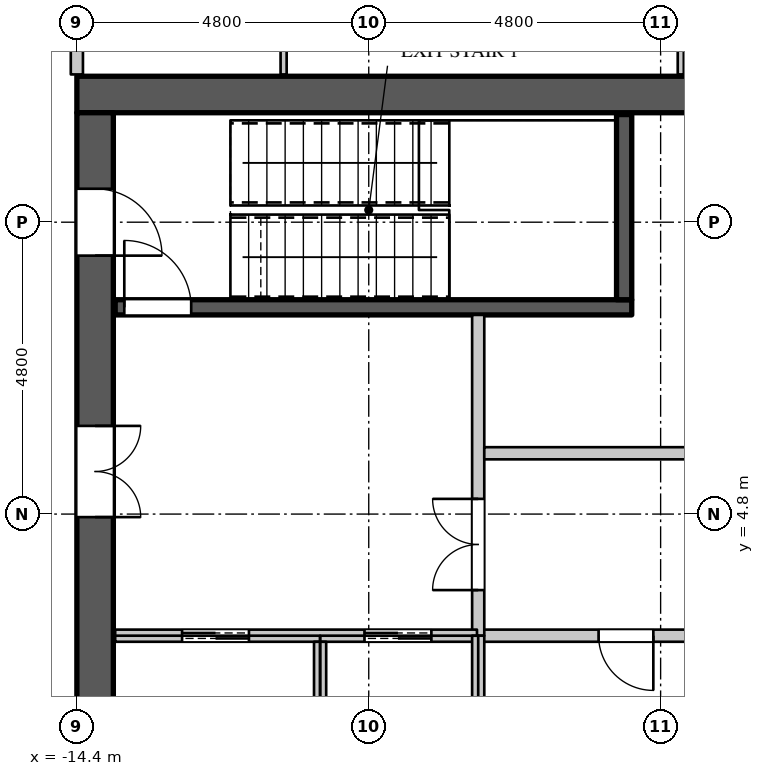
"""IFC4 building model, lengths in metres.
Left out: names, types, materials, properties, quantities, classifications, styles, units other than length and angle.
Written with IfcOpenShell. Run it as: python <this file> out.ifc"""

import sys

from ifc_helpers import new_model, si_unit, direction, frame, frame_2d, origin, place, context, subcontext, project, spatial, rectangle, extrude, element, fill, save


model = new_model("IFC4")
c1 = context("Model", 3, precision=1e-05, world=origin(), true_north=direction((0.0, 1.0)))
c2 = subcontext(c1, "Body", "Model", "MODEL_VIEW")
j1 = project(units=[si_unit("LENGTHUNIT", "METRE"), si_unit("PLANEANGLEUNIT", "RADIAN")], contexts=[c1])
p1 = place(None, origin())
s1 = spatial("IfcSite", under=j1, at=p1, CompositionType="ELEMENT")
p2 = place(p1, origin())
s2 = spatial("IfcBuilding", under=s1, at=p2, CompositionType="ELEMENT")
p3 = place(p2, frame((0.0, 0.0, 310.5)))
s3 = spatial("IfcBuildingStorey", under=s2, at=p3, CompositionType="ELEMENT", Elevation=310.5)
p4 = place(p3, frame((-14.4, 11.7, 0.0), z_axis=(0.0, 0.0, 1.0), x_axis=(1.0, 0.0, 0.0)))
e1 = element("IfcWall", 1, at=p4, inside=s3, PredefinedType="SHEAR", context=c2, shape_type="SweptSolid", body=[
    extrude(rectangle(XDim=28.8, YDim=0.6, at=frame_2d((14.4, 0.0))), origin(), (0.0, 0.0, 1.0), 4.2),
])
p5 = place(p3, frame((-14.1, -11.4, 0.0), z_axis=(0.0, 0.0, 1.0), x_axis=(0.0, 1.0, 0.0)))
e2 = element("IfcWall", 2, at=p5, inside=s3, PredefinedType="SHEAR", context=c2, shape_type="SweptSolid", body=[
    extrude(rectangle(XDim=22.8, YDim=0.6, at=frame_2d((11.4, 0.0))), origin(), (0.0, 0.0, 1.0), 4.2),
])
p6 = place(p5, frame((20.45, 0.0, 0.0)))
e3 = element("IfcOpeningElement", 3, at=p6, cuts=e2, PredefinedType="OPENING", context=c2, shape_type="SweptSolid", body=[
    extrude(rectangle(XDim=1.1, YDim=2.2, at=frame_2d((0.55, 1.1))), frame((0.0, 0.31, 0.0), z_axis=(0.0, -1.0, 0.0), x_axis=(1.0, 0.0, 0.0)), (0.0, 0.0, 1.0), 0.62),
])
p7 = place(p5, frame((1.25, 0.0, 0.0)))
e4 = element("IfcOpeningElement", 4, at=p7, cuts=e2, PredefinedType="OPENING", context=c2, shape_type="SweptSolid", body=[
    extrude(rectangle(XDim=1.1, YDim=2.2, at=frame_2d((0.55, 1.1))), frame((0.0, 0.31, 0.0), z_axis=(0.0, -1.0, 0.0), x_axis=(1.0, 0.0, 0.0)), (0.0, 0.0, 1.0), 0.62),
])
p8 = place(p5, frame((16.15, 0.0, 0.0)))
e5 = element("IfcOpeningElement", 5, at=p8, cuts=e2, PredefinedType="OPENING", context=c2, shape_type="SweptSolid", body=[
    extrude(rectangle(XDim=1.5, YDim=2.4, at=frame_2d((0.75, 1.2))), frame((0.0, 0.31, 0.0), z_axis=(0.0, -1.0, 0.0), x_axis=(1.0, 0.0, 0.0)), (0.0, 0.0, 1.0), 0.62),
])
p9 = place(p5, frame((5.15, 0.0, 0.0)))
e6 = element("IfcOpeningElement", 6, at=p9, cuts=e2, PredefinedType="OPENING", context=c2, shape_type="SweptSolid", body=[
    extrude(rectangle(XDim=1.5, YDim=2.4, at=frame_2d((0.75, 1.2))), frame((0.0, 0.31, 0.0), z_axis=(0.0, -1.0, 0.0), x_axis=(1.0, 0.0, 0.0)), (0.0, 0.0, 1.0), 0.62),
])
p10 = place(p3, frame((-14.4, 12.03, 0.0), z_axis=(0.0, 0.0, 1.0), x_axis=(0.0, 1.0, 0.0)))
e7 = element("IfcWall", 7, at=p10, inside=s3, PredefinedType="PARTITIONING", context=c2, shape_type="SweptSolid", body=[
    extrude(rectangle(XDim=2.27, YDim=0.2, at=frame_2d((1.135, 0.0))), origin(), (0.0, 0.0, 1.0), 3.9),
])
p11 = place(p3, frame((-7.82, 2.8, 0.0), z_axis=(0.0, 0.0, 1.0), x_axis=(1.0, 0.0, 0.0)))
e8 = element("IfcWall", 8, at=p11, inside=s3, PredefinedType="PARTITIONING", context=c2, shape_type="SweptSolid", body=[
    extrude(rectangle(XDim=18.24, YDim=0.2, at=frame_2d((9.12, 0.0))), origin(), (0.0, 0.0, 1.0), 3.9),
])
p12 = place(p11, frame((2.0, 0.0, 0.0)))
e9 = element("IfcOpeningElement", 9, at=p12, cuts=e8, PredefinedType="OPENING", context=c2, shape_type="SweptSolid", body=[
    extrude(rectangle(XDim=0.9, YDim=2.2, at=frame_2d((0.45, 1.1))), frame((0.0, 0.11, 0.0), z_axis=(0.0, -1.0, 0.0), x_axis=(1.0, 0.0, 0.0)), (0.0, 0.0, 1.0), 0.22),
])
p13 = place(p11, frame((6.1, 0.0, 0.0)))
e10 = element("IfcOpeningElement", 10, at=p13, cuts=e8, PredefinedType="OPENING", context=c2, shape_type="SweptSolid", body=[
    extrude(rectangle(XDim=0.9, YDim=2.2, at=frame_2d((0.45, 1.1))), frame((0.0, 0.11, 0.0), z_axis=(0.0, -1.0, 0.0), x_axis=(1.0, 0.0, 0.0)), (0.0, 0.0, 1.0), 0.22),
])
p14 = place(p11, frame((9.35, 0.0, 0.0)))
e11 = element("IfcOpeningElement", 11, at=p14, cuts=e8, PredefinedType="OPENING", context=c2, shape_type="SweptSolid", body=[
    extrude(rectangle(XDim=0.9, YDim=2.2, at=frame_2d((0.45, 1.1))), frame((0.0, 0.11, 0.0), z_axis=(0.0, -1.0, 0.0), x_axis=(1.0, 0.0, 0.0)), (0.0, 0.0, 1.0), 0.22),
])
p15 = place(p11, frame((14.3, 0.0, 0.0)))
e12 = element("IfcOpeningElement", 12, at=p15, cuts=e8, PredefinedType="OPENING", context=c2, shape_type="SweptSolid", body=[
    extrude(rectangle(XDim=0.9, YDim=2.2, at=frame_2d((0.45, 1.1))), frame((0.0, 0.11, 0.0), z_axis=(0.0, -1.0, 0.0), x_axis=(1.0, 0.0, 0.0)), (0.0, 0.0, 1.0), 0.22),
])
p16 = place(p3, frame((-7.8, 2.8, 0.0), z_axis=(0.0, 0.0, 1.0), x_axis=(0.0, 1.0, 0.0)))
e13 = element("IfcWall", 13, at=p16, inside=s3, PredefinedType="PARTITIONING", context=c2, shape_type="SweptSolid", body=[
    extrude(rectangle(XDim=5.275, YDim=0.2, at=frame_2d((2.637, 0.0))), origin(), (0.0, 0.0, 1.0), 3.9),
])
p17 = place(p16, frame((0.75, 0.0, 0.0)))
e14 = element("IfcOpeningElement", 14, at=p17, cuts=e13, PredefinedType="OPENING", context=c2, shape_type="SweptSolid", body=[
    extrude(rectangle(XDim=1.5, YDim=2.4, at=frame_2d((0.75, 1.2))), frame((0.0, 0.11, 0.0), z_axis=(0.0, -1.0, 0.0), x_axis=(1.0, 0.0, 0.0)), (0.0, 0.0, 1.0), 0.22),
])
p18 = place(p3, frame((-7.7, 5.8, 0.0), z_axis=(0.0, 0.0, 1.0), x_axis=(1.0, 0.0, 0.0)))
e15 = element("IfcWall", 15, at=p18, inside=s3, PredefinedType="PARTITIONING", context=c2, shape_type="SweptSolid", body=[
    extrude(rectangle(XDim=11.52, YDim=0.2, at=frame_2d((5.76, 0.0))), origin(), (0.0, 0.0, 1.0), 3.9),
])
p19 = place(p18, frame((5.3, 0.0, 0.0)))
e16 = element("IfcOpeningElement", 16, at=p19, cuts=e15, PredefinedType="OPENING", context=c2, shape_type="SweptSolid", body=[
    extrude(rectangle(XDim=0.9, YDim=2.2, at=frame_2d((0.45, 1.1))), frame((0.0, 0.11, 0.0), z_axis=(0.0, -1.0, 0.0), x_axis=(1.0, 0.0, 0.0)), (0.0, 0.0, 1.0), 0.22),
])
p20 = place(p3, frame((-13.77, 2.8, 0.0), z_axis=(0.0, 0.0, 1.0), x_axis=(1.0, 0.0, 0.0)))
e17 = element("IfcWall", 17, at=p20, inside=s3, PredefinedType="PARTITIONING", context=c2, shape_type="SweptSolid", body=[
    extrude(rectangle(XDim=5.95, YDim=0.2, at=frame_2d((2.975, 0.0))), origin(), (0.0, 0.0, 1.0), 3.9),
])
p21 = place(p20, frame((1.1, 0.0, 0.0)))
e18 = element("IfcOpeningElement", 18, at=p21, cuts=e17, PredefinedType="OPENING", context=c2, shape_type="SweptSolid", body=[
    extrude(rectangle(XDim=1.1, YDim=2.2, at=frame_2d((0.55, 1.1))), frame((0.0, 0.11, 0.0), z_axis=(0.0, -1.0, 0.0), x_axis=(1.0, 0.0, 0.0)), (0.0, 0.0, 1.0), 0.22),
])
p22 = place(p20, frame((4.1, 0.0, 0.0)))
e19 = element("IfcOpeningElement", 19, at=p22, cuts=e17, PredefinedType="OPENING", context=c2, shape_type="SweptSolid", body=[
    extrude(rectangle(XDim=1.1, YDim=2.2, at=frame_2d((0.55, 1.1))), frame((0.0, 0.11, 0.0), z_axis=(0.0, -1.0, 0.0), x_axis=(1.0, 0.0, 0.0)), (0.0, 0.0, 1.0), 0.22),
])
p23 = place(p3, frame((-10.4, 0.0, 0.0), z_axis=(0.0, 0.0, 1.0), x_axis=(0.0, 1.0, 0.0)))
e20 = element("IfcWall", 20, at=p23, inside=s3, PredefinedType="PARTITIONING", context=c2, shape_type="SweptSolid", body=[
    extrude(rectangle(XDim=2.7, YDim=0.2, at=frame_2d((1.35, 0.0))), origin(), (0.0, 0.0, 1.0), 3.9),
])
p24 = place(p3, frame((-7.8, 0.0, 0.0), z_axis=(0.0, 0.0, 1.0), x_axis=(0.0, 1.0, 0.0)))
e21 = element("IfcWall", 21, at=p24, inside=s3, PredefinedType="PARTITIONING", context=c2, shape_type="SweptSolid", body=[
    extrude(rectangle(XDim=2.8, YDim=0.2, at=frame_2d((1.4, 0.0))), origin(), (0.0, 0.0, 1.0), 3.9),
])
p25 = place(p3, frame((-13.77, 8.2, 0.0), z_axis=(0.0, 0.0, 1.0), x_axis=(1.0, 0.0, 0.0)))
e22 = element("IfcWall", 22, at=p25, inside=s3, PredefinedType="SHEAR", context=c2, shape_type="SweptSolid", body=[
    extrude(rectangle(XDim=8.495, YDim=0.25, at=frame_2d((4.248, 0.0))), origin(), (0.0, 0.0, 1.0), 3.9),
])
p26 = place(p25, frame((0.15, 0.0, 0.0)))
e23 = element("IfcOpeningElement", 23, at=p26, cuts=e22, PredefinedType="OPENING", context=c2, shape_type="SweptSolid", body=[
    extrude(rectangle(XDim=1.1, YDim=2.2, at=frame_2d((0.55, 1.1))), frame((0.0, 0.135, 0.0), z_axis=(0.0, -1.0, 0.0), x_axis=(1.0, 0.0, 0.0)), (0.0, 0.0, 1.0), 0.27),
])
p27 = place(p3, frame((-5.4, 8.325, 0.0), z_axis=(0.0, 0.0, 1.0), x_axis=(0.0, 1.0, 0.0)))
e24 = element("IfcWall", 24, at=p27, inside=s3, PredefinedType="SHEAR", context=c2, shape_type="SweptSolid", body=[
    extrude(rectangle(XDim=3.045, YDim=0.25, at=frame_2d((1.522, 0.0))), origin(), (0.0, 0.0, 1.0), 3.9),
])
p28 = place(p3, frame((-11.0, 12.03, 0.0), z_axis=(0.0, 0.0, 1.0), x_axis=(0.0, 1.0, 0.0)))
e25 = element("IfcWall", 25, at=p28, inside=s3, PredefinedType="PARTITIONING", context=c2, shape_type="SweptSolid", body=[
    extrude(rectangle(XDim=6.195, YDim=0.1, at=frame_2d((3.098, 0.0))), origin(), (0.0, 0.0, 1.0), 3.9),
])
p29 = place(p28, frame((2.65, 0.0, 0.0)))
e26 = element("IfcOpeningElement", 26, at=p29, cuts=e25, PredefinedType="OPENING", context=c2, shape_type="SweptSolid", body=[
    extrude(rectangle(XDim=0.9, YDim=2.2, at=frame_2d((0.45, 1.1))), frame((0.0, 0.06, 0.0), z_axis=(0.0, -1.0, 0.0), x_axis=(1.0, 0.0, 0.0)), (0.0, 0.0, 1.0), 0.12),
])
p30 = place(p3, frame((-4.469, 12.03, 0.0), z_axis=(0.0, 0.0, 1.0), x_axis=(0.0, 1.0, 0.0)))
e27 = element("IfcWall", 27, at=p30, inside=s3, PredefinedType="PARTITIONING", context=c2, shape_type="SweptSolid", body=[
    extrude(rectangle(XDim=5.75, YDim=0.1, at=frame_2d((2.875, 0.0))), origin(), (0.0, 0.0, 1.0), 3.3),
])
p31 = place(p12, origin())
e28 = element("IfcDoor", 28, at=p31, inside=s3, OperationType="SINGLE_SWING_LEFT", PredefinedType="DOOR", context=c2, shape_type="SweptSolid", body=[
    extrude(rectangle(XDim=0.9, YDim=2.2, at=frame_2d((0.45, 1.1))), frame((0.0, 0.025, 0.0), z_axis=(0.0, -1.0, 0.0), x_axis=(1.0, 0.0, 0.0)), (0.0, 0.0, 1.0), 0.05),
])
fill(e9, e28)
p32 = place(p21, origin())
e29 = element("IfcDoor", 29, at=p32, inside=s3, OperationType="DOUBLE_DOOR_SLIDING", PredefinedType="DOOR", context=c2, shape_type="SweptSolid", body=[
    extrude(rectangle(XDim=1.1, YDim=2.2, at=frame_2d((0.55, 1.1))), frame((0.0, 0.025, 0.0), z_axis=(0.0, -1.0, 0.0), x_axis=(1.0, 0.0, 0.0)), (0.0, 0.0, 1.0), 0.05),
])
fill(e18, e29)
p33 = place(p22, origin())
e30 = element("IfcDoor", 30, at=p33, inside=s3, OperationType="DOUBLE_DOOR_SLIDING", PredefinedType="DOOR", context=c2, shape_type="SweptSolid", body=[
    extrude(rectangle(XDim=1.1, YDim=2.2, at=frame_2d((0.55, 1.1))), frame((0.0, 0.025, 0.0), z_axis=(0.0, -1.0, 0.0), x_axis=(1.0, 0.0, 0.0)), (0.0, 0.0, 1.0), 0.05),
])
fill(e19, e30)
p34 = place(p26, origin())
e31 = element("IfcDoor", 31, at=p34, inside=s3, OperationType="SINGLE_SWING_LEFT", PredefinedType="DOOR", context=c2, shape_type="SweptSolid", body=[
    extrude(rectangle(XDim=1.1, YDim=2.2, at=frame_2d((0.55, 1.1))), frame((0.0, 0.025, 0.0), z_axis=(0.0, -1.0, 0.0), x_axis=(1.0, 0.0, 0.0)), (0.0, 0.0, 1.0), 0.05),
])
fill(e23, e31)
p35 = place(p17, origin())
e32 = element("IfcDoor", 32, at=p35, inside=s3, OperationType="DOUBLE_DOOR_SINGLE_SWING", PredefinedType="DOOR", context=c2, shape_type="SweptSolid", body=[
    extrude(rectangle(XDim=1.5, YDim=2.4, at=frame_2d((0.75, 1.2))), frame((0.0, 0.025, 0.0), z_axis=(0.0, -1.0, 0.0), x_axis=(1.0, 0.0, 0.0)), (0.0, 0.0, 1.0), 0.05),
])
fill(e14, e32)
p36 = place(p6, origin())
e33 = element("IfcDoor", 33, at=p36, inside=s3, OperationType="SINGLE_SWING_RIGHT", PredefinedType="DOOR", context=c2, shape_type="SweptSolid", body=[
    extrude(rectangle(XDim=1.1, YDim=2.2, at=frame_2d((0.55, 1.1))), frame((0.0, -0.245, 0.0), z_axis=(0.0, -1.0, 0.0), x_axis=(1.0, 0.0, 0.0)), (0.0, 0.0, 1.0), 0.05),
])
fill(e3, e33)
p37 = place(p8, origin())
e34 = element("IfcDoor", 34, at=p37, inside=s3, OperationType="DOUBLE_DOOR_SINGLE_SWING", PredefinedType="DOOR", context=c2, shape_type="SweptSolid", body=[
    extrude(rectangle(XDim=1.5, YDim=2.4, at=frame_2d((0.75, 1.2))), frame((0.0, -0.245, 0.0), z_axis=(0.0, -1.0, 0.0), x_axis=(1.0, 0.0, 0.0)), (0.0, 0.0, 1.0), 0.05),
])
fill(e5, e34)
save(model, sys.argv[1])
